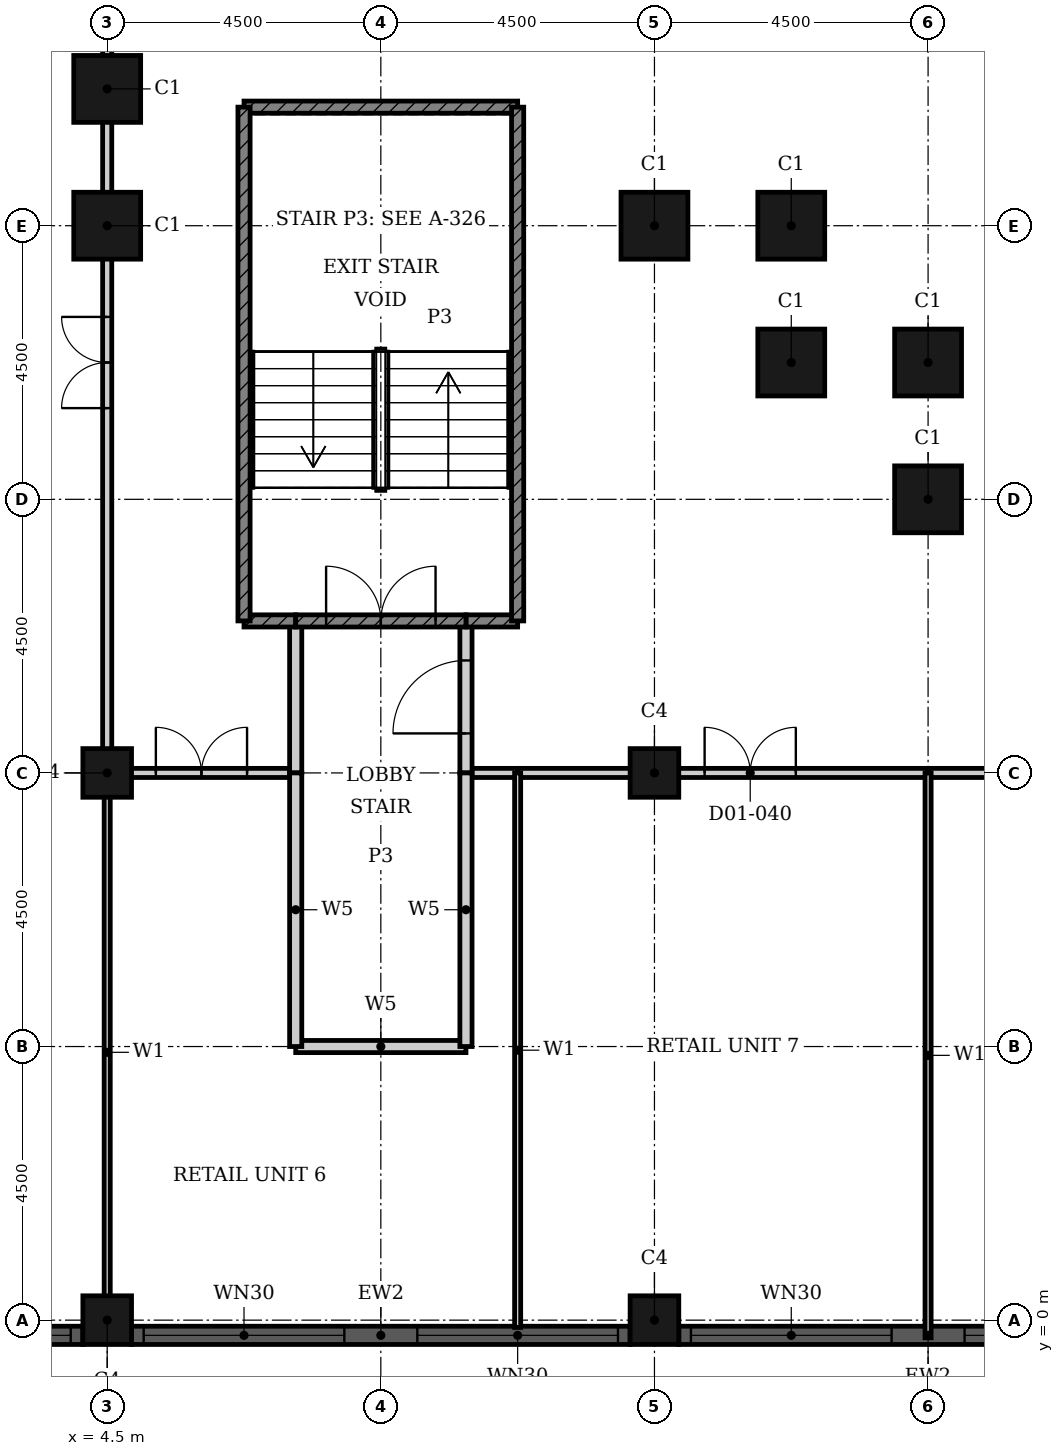
"""IFC4 building model, lengths in metres.
Left out: names, types, materials, properties, quantities, classifications, styles, units other than length and angle.
Written with IfcOpenShell. Run it as: python <this file> out.ifc"""

import sys

from ifc_helpers import new_model, si_unit, direction, frame, frame_2d, origin, origin_2d, place, context, subcontext, project, spatial, rectangle, hollow_rectangle, extrude, element, fill, save


model = new_model("IFC4")
c1 = context("Model", 3, precision=1e-05, world=origin(), true_north=direction((0.0, 1.0)))
c2 = subcontext(c1, "Body", "Model", "MODEL_VIEW")
j1 = project(units=[si_unit("LENGTHUNIT", "METRE"), si_unit("PLANEANGLEUNIT", "RADIAN")], contexts=[c1])
p1 = place(None, origin())
s1 = spatial("IfcSite", under=j1, at=p1, CompositionType="ELEMENT")
p2 = place(p1, origin())
s2 = spatial("IfcBuilding", under=s1, at=p2, CompositionType="ELEMENT")
p3 = place(p2, frame((0.0, 0.0, 6.6)))
s3 = spatial("IfcBuildingStorey", under=s2, at=p3, CompositionType="ELEMENT", Elevation=6.6)
for number, where, z_axis, x_axis in (
    (1, (4.5, 20.25, 0.0), (0.0, 0.0, 1.0), (1.0, 0.0, 0.0)),
    (2, (4.5, 18.0, 0.0), (0.0, 0.0, 1.0), (1.0, 0.0, 0.0)),
    (3, (13.5, 18.0, 0.0), (0.0, 0.0, 1.0), (1.0, 0.0, 0.0)),
    (4, (15.75, 18.0, 0.0), (0.0, 0.0, 1.0), (1.0, 0.0, 0.0)),
    (5, (15.75, 15.75, 0.0), (0.0, 0.0, 1.0), (1.0, 0.0, 0.0)),
    (6, (18.0, 15.75, 0.0), (0.0, 0.0, 1.0), (1.0, 0.0, 0.0)),
    (7, (18.0, 13.5, 0.0), (0.0, 0.0, 1.0), (1.0, 0.0, 0.0)),
):
    element("IfcColumn", number, at=place(p3, frame(where, z_axis=z_axis, x_axis=x_axis)), inside=s3, PredefinedType="COLUMN", context=c2, shape_type="SweptSolid", body=[
        extrude(hollow_rectangle(XDim=1.1, YDim=1.1, WallThickness=0.036, at=origin_2d()), origin(), (0.0, 0.0, 1.0), 5.4),
    ])
for number, where, z_axis, x_axis in (
    (8, (4.5, 0.0, 0.0), (0.0, 0.0, 1.0), (1.0, 0.0, 0.0)),
    (9, (13.5, 0.0, 0.0), (0.0, 0.0, 1.0), (1.0, 0.0, 0.0)),
    (10, (4.5, 9.0, 0.0), (0.0, 0.0, 1.0), (1.0, 0.0, 0.0)),
    (11, (13.5, 9.0, 0.0), (0.0, 0.0, 1.0), (1.0, 0.0, 0.0)),
):
    element("IfcColumn", number, at=place(p3, frame(where, z_axis=z_axis, x_axis=x_axis)), inside=s3, PredefinedType="COLUMN", context=c2, shape_type="SweptSolid", body=[
        extrude(hollow_rectangle(XDim=0.8, YDim=0.8, WallThickness=0.025, at=origin_2d()), origin(), (0.0, 0.0, 1.0), 5.4),
    ])
p4 = place(p3, frame((-4.1, -0.25, 0.0), z_axis=(0.0, 0.0, 1.0), x_axis=(1.0, 0.0, 0.0)))
e12 = element("IfcWall", 12, at=p4, inside=s3, PredefinedType="SOLIDWALL", context=c2, shape_type="SweptSolid", body=[
    extrude(rectangle(XDim=8.2, YDim=0.3, at=frame_2d((4.1, 0.0))), origin(), (0.0, 0.0, 1.0), 5.4),
])
p5 = place(p4, frame((0.2, 0.0, 0.9)))
e13 = element("IfcOpeningElement", 13, at=p5, cuts=e12, PredefinedType="OPENING", context=c2, shape_type="SweptSolid", body=[
    extrude(rectangle(XDim=3.3, YDim=3.5, at=frame_2d((1.65, 1.75))), frame((0.0, 0.16, 0.0), z_axis=(0.0, -1.0, 0.0), x_axis=(1.0, 0.0, 0.0)), (0.0, 0.0, 1.0), 0.32),
])
p6 = place(p4, frame((4.7, 0.0, 0.9)))
e14 = element("IfcOpeningElement", 14, at=p6, cuts=e12, PredefinedType="OPENING", context=c2, shape_type="SweptSolid", body=[
    extrude(rectangle(XDim=3.3, YDim=3.5, at=frame_2d((1.65, 1.75))), frame((0.0, 0.16, 0.0), z_axis=(0.0, -1.0, 0.0), x_axis=(1.0, 0.0, 0.0)), (0.0, 0.0, 1.0), 0.32),
])
p7 = place(p3, frame((4.9, -0.25, 0.0), z_axis=(0.0, 0.0, 1.0), x_axis=(1.0, 0.0, 0.0)))
e15 = element("IfcWall", 15, at=p7, inside=s3, PredefinedType="SOLIDWALL", context=c2, shape_type="SweptSolid", body=[
    extrude(rectangle(XDim=8.2, YDim=0.3, at=frame_2d((4.1, 0.0))), origin(), (0.0, 0.0, 1.0), 5.4),
])
p8 = place(p7, frame((0.2, 0.0, 0.9)))
e16 = element("IfcOpeningElement", 16, at=p8, cuts=e15, PredefinedType="OPENING", context=c2, shape_type="SweptSolid", body=[
    extrude(rectangle(XDim=3.3, YDim=3.5, at=frame_2d((1.65, 1.75))), frame((0.0, 0.16, 0.0), z_axis=(0.0, -1.0, 0.0), x_axis=(1.0, 0.0, 0.0)), (0.0, 0.0, 1.0), 0.32),
])
p9 = place(p7, frame((4.7, 0.0, 0.9)))
e17 = element("IfcOpeningElement", 17, at=p9, cuts=e15, PredefinedType="OPENING", context=c2, shape_type="SweptSolid", body=[
    extrude(rectangle(XDim=3.3, YDim=3.5, at=frame_2d((1.65, 1.75))), frame((0.0, 0.16, 0.0), z_axis=(0.0, -1.0, 0.0), x_axis=(1.0, 0.0, 0.0)), (0.0, 0.0, 1.0), 0.32),
])
p10 = place(p3, frame((13.9, -0.25, 0.0), z_axis=(0.0, 0.0, 1.0), x_axis=(1.0, 0.0, 0.0)))
e18 = element("IfcWall", 18, at=p10, inside=s3, PredefinedType="SOLIDWALL", context=c2, shape_type="SweptSolid", body=[
    extrude(rectangle(XDim=8.2, YDim=0.3, at=frame_2d((4.1, 0.0))), origin(), (0.0, 0.0, 1.0), 5.4),
])
p11 = place(p10, frame((0.2, 0.0, 0.9)))
e19 = element("IfcOpeningElement", 19, at=p11, cuts=e18, PredefinedType="OPENING", context=c2, shape_type="SweptSolid", body=[
    extrude(rectangle(XDim=3.3, YDim=3.5, at=frame_2d((1.65, 1.75))), frame((0.0, 0.16, 0.0), z_axis=(0.0, -1.0, 0.0), x_axis=(1.0, 0.0, 0.0)), (0.0, 0.0, 1.0), 0.32),
])
p12 = place(p10, frame((4.7, 0.0, 0.9)))
e20 = element("IfcOpeningElement", 20, at=p12, cuts=e18, PredefinedType="OPENING", context=c2, shape_type="SweptSolid", body=[
    extrude(rectangle(XDim=3.3, YDim=3.5, at=frame_2d((1.65, 1.75))), frame((0.0, 0.16, 0.0), z_axis=(0.0, -1.0, 0.0), x_axis=(1.0, 0.0, 0.0)), (0.0, 0.0, 1.0), 0.32),
])
p13 = place(p3, frame((4.5, 9.0, 0.0), z_axis=(0.0, 0.0, 1.0), x_axis=(1.0, 0.0, 0.0)))
e21 = element("IfcWall", 21, at=p13, inside=s3, PredefinedType="PARTITIONING", context=c2, shape_type="SweptSolid", body=[
    extrude(rectangle(XDim=3.1, YDim=0.15, at=frame_2d((1.55, 0.0))), origin(), (0.0, 0.0, 1.0), 5.05),
])
p14 = place(p13, frame((0.8, 0.0, 0.0)))
e22 = element("IfcOpeningElement", 22, at=p14, cuts=e21, PredefinedType="OPENING", context=c2, shape_type="SweptSolid", body=[
    extrude(rectangle(XDim=1.5, YDim=2.4, at=frame_2d((0.75, 1.2))), frame((0.0, 0.085, 0.0), z_axis=(0.0, -1.0, 0.0), x_axis=(1.0, 0.0, 0.0)), (0.0, 0.0, 1.0), 0.17),
])
p15 = place(p3, frame((10.4, 9.0, 0.0), z_axis=(0.0, 0.0, 1.0), x_axis=(1.0, 0.0, 0.0)))
e23 = element("IfcWall", 23, at=p15, inside=s3, PredefinedType="PARTITIONING", context=c2, shape_type="SweptSolid", body=[
    extrude(rectangle(XDim=0.85, YDim=0.15, at=frame_2d((0.425, 0.0))), origin(), (0.0, 0.0, 1.0), 5.05),
])
p16 = place(p3, frame((11.25, 9.0, 0.0), z_axis=(0.0, 0.0, 1.0), x_axis=(1.0, 0.0, 0.0)))
e24 = element("IfcWall", 24, at=p16, inside=s3, PredefinedType="PARTITIONING", context=c2, shape_type="SweptSolid", body=[
    extrude(rectangle(XDim=6.75, YDim=0.15, at=frame_2d((3.375, 0.0))), origin(), (0.0, 0.0, 1.0), 5.05),
])
p17 = place(p16, frame((3.075, 0.0, 0.0)))
e25 = element("IfcOpeningElement", 25, at=p17, cuts=e24, PredefinedType="OPENING", context=c2, shape_type="SweptSolid", body=[
    extrude(rectangle(XDim=1.5, YDim=2.4, at=frame_2d((0.75, 1.2))), frame((0.0, 0.085, 0.0), z_axis=(0.0, -1.0, 0.0), x_axis=(1.0, 0.0, 0.0)), (0.0, 0.0, 1.0), 0.17),
])
p18 = place(p3, frame((18.0, 9.0, 0.0), z_axis=(0.0, 0.0, 1.0), x_axis=(1.0, 0.0, 0.0)))
e26 = element("IfcWall", 26, at=p18, inside=s3, PredefinedType="PARTITIONING", context=c2, shape_type="SweptSolid", body=[
    extrude(rectangle(XDim=10.0, YDim=0.15, at=frame_2d((5.0, 0.0))), origin(), (0.0, 0.0, 1.0), 5.05),
])
p19 = place(p18, frame((5.15, 0.0, 0.0)))
e27 = element("IfcOpeningElement", 27, at=p19, cuts=e26, PredefinedType="OPENING", context=c2, shape_type="SweptSolid", body=[
    extrude(rectangle(XDim=1.5, YDim=2.4, at=frame_2d((0.75, 1.2))), frame((0.0, 0.085, 0.0), z_axis=(0.0, -1.0, 0.0), x_axis=(1.0, 0.0, 0.0)), (0.0, 0.0, 1.0), 0.17),
])
p20 = place(p3, frame((4.5, 9.0, 0.0), z_axis=(0.0, 0.0, 1.0), x_axis=(0.0, 1.0, 0.0)))
e28 = element("IfcWall", 28, at=p20, inside=s3, PredefinedType="PARTITIONING", context=c2, shape_type="SweptSolid", body=[
    extrude(rectangle(XDim=13.5, YDim=0.15, at=frame_2d((6.75, 0.0))), origin(), (0.0, 0.0, 1.0), 5.05),
])
p21 = place(p20, frame((6.0, 0.0, 0.0)))
e29 = element("IfcOpeningElement", 29, at=p21, cuts=e28, PredefinedType="OPENING", context=c2, shape_type="SweptSolid", body=[
    extrude(rectangle(XDim=1.5, YDim=2.4, at=frame_2d((0.75, 1.2))), frame((0.0, 0.085, 0.0), z_axis=(0.0, -1.0, 0.0), x_axis=(1.0, 0.0, 0.0)), (0.0, 0.0, 1.0), 0.17),
])
p22 = place(p3, frame((11.25, -0.12, 0.0), z_axis=(0.0, 0.0, 1.0), x_axis=(0.0, 1.0, 0.0)))
e30 = element("IfcWall", 30, at=p22, inside=s3, PredefinedType="PARTITIONING", context=c2, shape_type="SweptSolid", body=[
    extrude(rectangle(XDim=9.12, YDim=0.1, at=frame_2d((4.56, 0.0))), origin(), (0.0, 0.0, 1.0), 5.05),
])
p23 = place(p3, frame((18.0, -0.29, 0.0), z_axis=(0.0, 0.0, 1.0), x_axis=(0.0, 1.0, 0.0)))
e31 = element("IfcWall", 31, at=p23, inside=s3, PredefinedType="PARTITIONING", context=c2, shape_type="SweptSolid", body=[
    extrude(rectangle(XDim=9.29, YDim=0.1, at=frame_2d((4.645, 0.0))), origin(), (0.0, 0.0, 1.0), 5.05),
])
p24 = place(p3, frame((4.5, -0.19, 0.0), z_axis=(0.0, 0.0, 1.0), x_axis=(0.0, 1.0, 0.0)))
e32 = element("IfcWall", 32, at=p24, inside=s3, PredefinedType="PARTITIONING", context=c2, shape_type="SweptSolid", body=[
    extrude(rectangle(XDim=9.19, YDim=0.1, at=frame_2d((4.595, 0.0))), origin(), (0.0, 0.0, 1.0), 5.05),
])
p25 = place(p3, frame((7.6, 4.5, 0.0), z_axis=(0.0, 0.0, 1.0), x_axis=(1.0, 0.0, 0.0)))
e33 = element("IfcWall", 33, at=p25, inside=s3, PredefinedType="PARTITIONING", context=c2, shape_type="SweptSolid", body=[
    extrude(rectangle(XDim=2.8, YDim=0.2, at=frame_2d((1.4, 0.0))), origin(), (0.0, 0.0, 1.0), 5.05),
])
p26 = place(p3, frame((10.4, 9.0, 0.0), z_axis=(0.0, 0.0, 1.0), x_axis=(0.0, 1.0, 0.0)))
e34 = element("IfcWall", 34, at=p26, inside=s3, PredefinedType="PARTITIONING", context=c2, shape_type="SweptSolid", body=[
    extrude(rectangle(XDim=2.5, YDim=0.2, at=frame_2d((1.25, 0.0))), origin(), (0.0, 0.0, 1.0), 5.05),
])
p27 = place(p26, frame((0.65, 0.0, 0.0)))
e35 = element("IfcOpeningElement", 35, at=p27, cuts=e34, PredefinedType="OPENING", context=c2, shape_type="SweptSolid", body=[
    extrude(rectangle(XDim=1.2, YDim=2.1, at=frame_2d((0.6, 1.05))), frame((0.0, 0.11, 0.0), z_axis=(0.0, -1.0, 0.0), x_axis=(1.0, 0.0, 0.0)), (0.0, 0.0, 1.0), 0.22),
])
p28 = place(p3, frame((10.4, 4.5, 0.0), z_axis=(0.0, 0.0, 1.0), x_axis=(0.0, 1.0, 0.0)))
e36 = element("IfcWall", 36, at=p28, inside=s3, PredefinedType="PARTITIONING", context=c2, shape_type="SweptSolid", body=[
    extrude(rectangle(XDim=4.5, YDim=0.2, at=frame_2d((2.25, 0.0))), origin(), (0.0, 0.0, 1.0), 5.05),
])
p29 = place(p3, frame((7.6, 9.0, 0.0), z_axis=(0.0, 0.0, 1.0), x_axis=(0.0, 1.0, 0.0)))
e37 = element("IfcWall", 37, at=p29, inside=s3, PredefinedType="PARTITIONING", context=c2, shape_type="SweptSolid", body=[
    extrude(rectangle(XDim=2.5, YDim=0.2, at=frame_2d((1.25, 0.0))), origin(), (0.0, 0.0, 1.0), 5.05),
])
p30 = place(p3, frame((7.6, 4.5, 0.0), z_axis=(0.0, 0.0, 1.0), x_axis=(0.0, 1.0, 0.0)))
e38 = element("IfcWall", 38, at=p30, inside=s3, PredefinedType="PARTITIONING", context=c2, shape_type="SweptSolid", body=[
    extrude(rectangle(XDim=4.5, YDim=0.2, at=frame_2d((2.25, 0.0))), origin(), (0.0, 0.0, 1.0), 5.05),
])
for number, where, z_axis, x_axis in (
    (39, (6.75, 11.5, 0.0), (0.0, 0.0, 1.0), (1.0, 0.0, 0.0)),
    (40, (10.4, 11.5, 0.0), (0.0, 0.0, 1.0), (1.0, 0.0, 0.0)),
):
    element("IfcWall", number, at=place(p3, frame(where, z_axis=z_axis, x_axis=x_axis)), inside=s3, PredefinedType="SHEAR", context=c2, shape_type="SweptSolid", body=[
        extrude(rectangle(XDim=0.85, YDim=0.2, at=frame_2d((0.425, 0.0))), origin(), (0.0, 0.0, 1.0), 5.05),
    ])
p31 = place(p3, frame((7.6, 11.5, 0.0), z_axis=(0.0, 0.0, 1.0), x_axis=(1.0, 0.0, 0.0)))
e41 = element("IfcWall", 41, at=p31, inside=s3, PredefinedType="SHEAR", context=c2, shape_type="SweptSolid", body=[
    extrude(rectangle(XDim=2.8, YDim=0.2, at=frame_2d((1.4, 0.0))), origin(), (0.0, 0.0, 1.0), 5.05),
])
p32 = place(p31, frame((0.5, 0.0, 0.0)))
e42 = element("IfcOpeningElement", 42, at=p32, cuts=e41, PredefinedType="OPENING", context=c2, shape_type="SweptSolid", body=[
    extrude(rectangle(XDim=1.8, YDim=2.1, at=frame_2d((0.9, 1.05))), frame((0.0, 0.11, 0.0), z_axis=(0.0, -1.0, 0.0), x_axis=(1.0, 0.0, 0.0)), (0.0, 0.0, 1.0), 0.22),
])
p33 = place(p3, frame((6.75, 19.95, 0.0), z_axis=(0.0, 0.0, 1.0), x_axis=(1.0, 0.0, 0.0)))
e43 = element("IfcWall", 43, at=p33, inside=s3, PredefinedType="SHEAR", context=c2, shape_type="SweptSolid", body=[
    extrude(rectangle(XDim=4.5, YDim=0.2, at=frame_2d((2.25, 0.0))), origin(), (0.0, 0.0, 1.0), 5.05),
])
for number, where, z_axis, x_axis in (
    (44, (11.25, 11.5, 0.0), (0.0, 0.0, 1.0), (0.0, 1.0, 0.0)),
    (45, (6.75, 11.5, 0.0), (0.0, 0.0, 1.0), (0.0, 1.0, 0.0)),
):
    element("IfcWall", number, at=place(p3, frame(where, z_axis=z_axis, x_axis=x_axis)), inside=s3, PredefinedType="SHEAR", context=c2, shape_type="SweptSolid", body=[
        extrude(rectangle(XDim=8.45, YDim=0.2, at=frame_2d((4.225, 0.0))), origin(), (0.0, 0.0, 1.0), 5.05),
    ])
p34 = place(p6, origin())
e46 = element("IfcWindow", 46, at=p34, inside=s3, PartitioningType="SINGLE_PANEL", PredefinedType="WINDOW", context=c2, shape_type="SweptSolid", body=[
    extrude(rectangle(XDim=3.3, YDim=3.5, at=frame_2d((1.65, 1.75))), frame((0.0, 0.03, 0.0), z_axis=(0.0, -1.0, 0.0), x_axis=(1.0, 0.0, 0.0)), (0.0, 0.0, 1.0), 0.06),
])
fill(e14, e46)
p35 = place(p8, origin())
e47 = element("IfcWindow", 47, at=p35, inside=s3, PartitioningType="SINGLE_PANEL", PredefinedType="WINDOW", context=c2, shape_type="SweptSolid", body=[
    extrude(rectangle(XDim=3.3, YDim=3.5, at=frame_2d((1.65, 1.75))), frame((0.0, 0.03, 0.0), z_axis=(0.0, -1.0, 0.0), x_axis=(1.0, 0.0, 0.0)), (0.0, 0.0, 1.0), 0.06),
])
fill(e16, e47)
p36 = place(p9, origin())
e48 = element("IfcWindow", 48, at=p36, inside=s3, PartitioningType="SINGLE_PANEL", PredefinedType="WINDOW", context=c2, shape_type="SweptSolid", body=[
    extrude(rectangle(XDim=3.3, YDim=3.5, at=frame_2d((1.65, 1.75))), frame((0.0, 0.03, 0.0), z_axis=(0.0, -1.0, 0.0), x_axis=(1.0, 0.0, 0.0)), (0.0, 0.0, 1.0), 0.06),
])
fill(e17, e48)
p37 = place(p11, origin())
e49 = element("IfcWindow", 49, at=p37, inside=s3, PartitioningType="SINGLE_PANEL", PredefinedType="WINDOW", context=c2, shape_type="SweptSolid", body=[
    extrude(rectangle(XDim=3.3, YDim=3.5, at=frame_2d((1.65, 1.75))), frame((0.0, 0.03, 0.0), z_axis=(0.0, -1.0, 0.0), x_axis=(1.0, 0.0, 0.0)), (0.0, 0.0, 1.0), 0.06),
])
fill(e19, e49)
p38 = place(p12, origin())
e50 = element("IfcWindow", 50, at=p38, inside=s3, PartitioningType="SINGLE_PANEL", PredefinedType="WINDOW", context=c2, shape_type="SweptSolid", body=[
    extrude(rectangle(XDim=3.3, YDim=3.5, at=frame_2d((1.65, 1.75))), frame((0.0, 0.03, 0.0), z_axis=(0.0, -1.0, 0.0), x_axis=(1.0, 0.0, 0.0)), (0.0, 0.0, 1.0), 0.06),
])
fill(e20, e50)
p39 = place(p27, origin())
e51 = element("IfcDoor", 51, at=p39, inside=s3, OperationType="SINGLE_SWING_LEFT", PredefinedType="DOOR", context=c2, shape_type="SweptSolid", body=[
    extrude(rectangle(XDim=1.2, YDim=2.1, at=frame_2d((0.6, 1.05))), frame((0.0, 0.025, 0.0), z_axis=(0.0, -1.0, 0.0), x_axis=(1.0, 0.0, 0.0)), (0.0, 0.0, 1.0), 0.05),
])
fill(e35, e51)
p40 = place(p32, origin())
e52 = element("IfcDoor", 52, at=p40, inside=s3, OperationType="DOUBLE_DOOR_SINGLE_SWING", PredefinedType="DOOR", context=c2, shape_type="SweptSolid", body=[
    extrude(rectangle(XDim=1.8, YDim=2.1, at=frame_2d((0.9, 1.05))), frame((0.0, 0.025, 0.0), z_axis=(0.0, -1.0, 0.0), x_axis=(1.0, 0.0, 0.0)), (0.0, 0.0, 1.0), 0.05),
])
fill(e42, e52)
p41 = place(p21, origin())
e53 = element("IfcDoor", 53, at=p41, inside=s3, OperationType="DOUBLE_DOOR_SINGLE_SWING", PredefinedType="DOOR", context=c2, shape_type="SweptSolid", body=[
    extrude(rectangle(XDim=1.5, YDim=2.4, at=frame_2d((0.75, 1.2))), frame((0.0, 0.025, 0.0), z_axis=(0.0, -1.0, 0.0), x_axis=(1.0, 0.0, 0.0)), (0.0, 0.0, 1.0), 0.05),
])
fill(e29, e53)
p42 = place(p14, origin())
e54 = element("IfcDoor", 54, at=p42, inside=s3, OperationType="DOUBLE_DOOR_SINGLE_SWING", PredefinedType="DOOR", context=c2, shape_type="SweptSolid", body=[
    extrude(rectangle(XDim=1.5, YDim=2.4, at=frame_2d((0.75, 1.2))), frame((0.0, 0.025, 0.0), z_axis=(0.0, -1.0, 0.0), x_axis=(1.0, 0.0, 0.0)), (0.0, 0.0, 1.0), 0.05),
])
fill(e22, e54)
p43 = place(p17, origin())
e55 = element("IfcDoor", 55, at=p43, inside=s3, OperationType="DOUBLE_DOOR_SINGLE_SWING", PredefinedType="DOOR", context=c2, shape_type="SweptSolid", body=[
    extrude(rectangle(XDim=1.5, YDim=2.4, at=frame_2d((0.75, 1.2))), frame((0.0, 0.025, 0.0), z_axis=(0.0, -1.0, 0.0), x_axis=(1.0, 0.0, 0.0)), (0.0, 0.0, 1.0), 0.05),
])
fill(e25, e55)
save(model, sys.argv[1])
